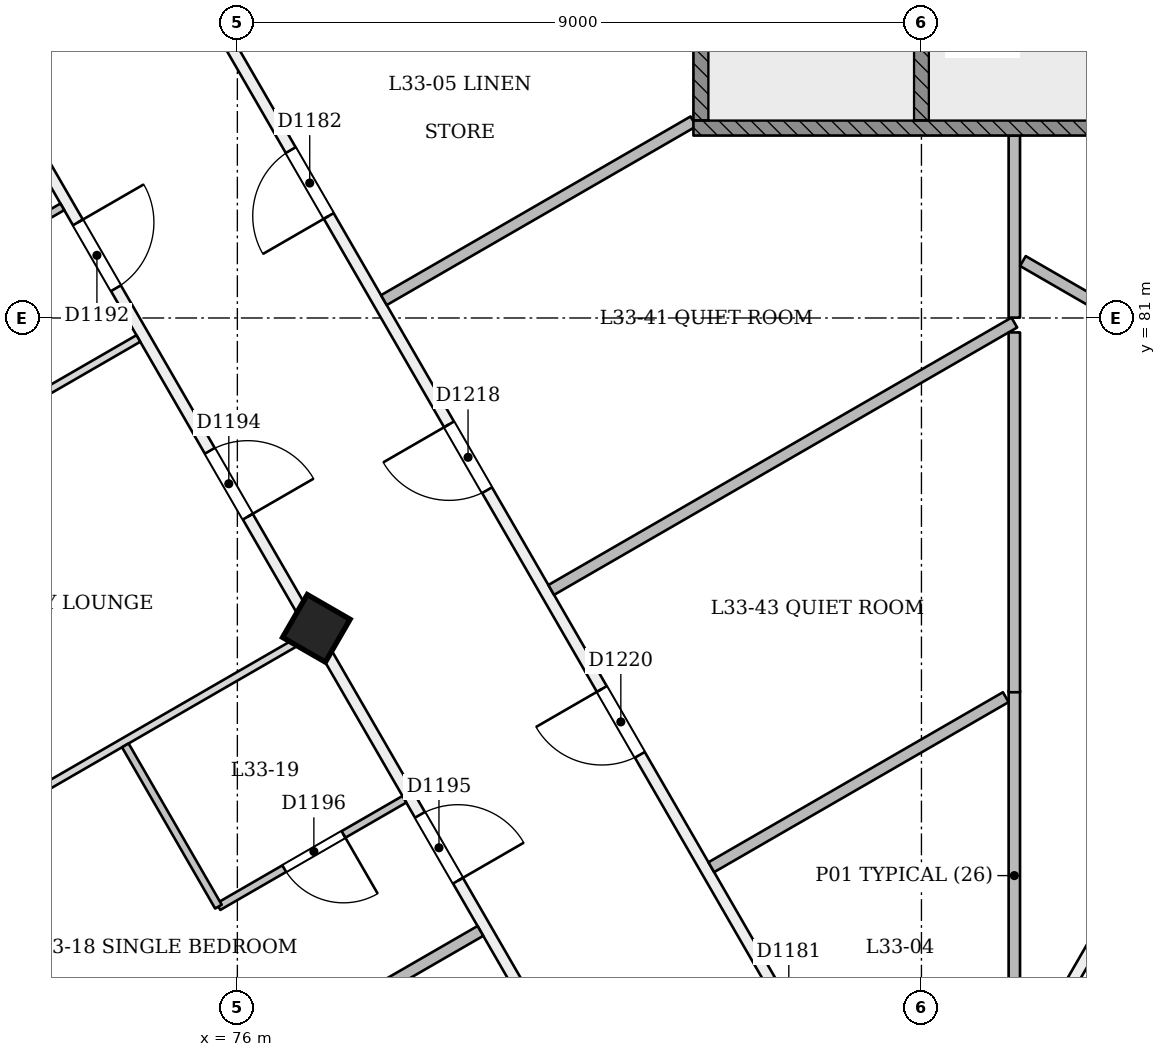
"""IFC4 building model, lengths in metres.
Left out: names, types, materials, properties, quantities, classifications, styles, units other than length and angle.
Written with IfcOpenShell. Run it as: python <this file> out.ifc"""

import sys

from ifc_helpers import new_model, si_unit, direction, frame, frame_2d, origin, origin_2d, place, context, subcontext, project, spatial, rectangle, extrude, element, fill, save


model = new_model("IFC4")
c1 = context("Model", 3, precision=1e-05, world=origin(), true_north=direction((0.0, 1.0)))
c2 = subcontext(c1, "Body", "Model", "MODEL_VIEW")
j1 = project(units=[si_unit("LENGTHUNIT", "METRE"), si_unit("PLANEANGLEUNIT", "RADIAN")], contexts=[c1])
p1 = place(None, origin())
s1 = spatial("IfcSite", under=j1, at=p1, CompositionType="ELEMENT")
p2 = place(p1, origin())
s2 = spatial("IfcBuilding", under=s1, at=p2, CompositionType="ELEMENT")
p3 = place(p2, frame((0.0, 0.0, 131.4)))
s3 = spatial("IfcBuildingStorey", under=s2, at=p3, CompositionType="ELEMENT", Elevation=131.4)
p4 = place(p3, frame((77.012, 76.87, -0.02), z_axis=(0.022155133694, 0.038483534979, 0.999013597298), x_axis=(-0.864982357223, -0.500326545966, 0.038456067068)))
e1 = element("IfcColumn", 1, at=p4, inside=s3, PredefinedType="COLUMN", context=c2, shape_type="SweptSolid", body=[
    extrude(rectangle(XDim=0.65, YDim=0.65, at=origin_2d()), origin(), (0.0, 0.0, 1.0), 3.604),
])
p5 = place(p3, frame((85.0, 68.836, 0.0), z_axis=(0.0, 0.0, 1.0), x_axis=(-0.500001726771, 0.86602440683, 0.0)))
e2 = element("IfcWall", 2, at=p5, inside=s3, PredefinedType="PARTITIONING", context=c2, shape_type="SweptSolid", body=[
    extrude(rectangle(XDim=24.669, YDim=0.15, at=frame_2d((12.335, 0.0))), origin(), (0.0, 0.0, 1.0), 3.15),
])
p6 = place(p5, frame((2.99, 0.0, 0.0)))
e3 = element("IfcOpeningElement", 3, at=p6, cuts=e2, PredefinedType="OPENING", context=c2, shape_type="SweptSolid", body=[
    extrude(rectangle(XDim=1.0, YDim=2.1, at=frame_2d((0.5, 1.05))), frame((0.0, 0.085, 0.0), z_axis=(0.0, -1.0, 0.0), x_axis=(1.0, 0.0, 0.0)), (0.0, 0.0, 1.0), 0.171),
])
p7 = place(p5, frame((15.596, 0.0, 0.0)))
e4 = element("IfcOpeningElement", 4, at=p7, cuts=e2, PredefinedType="OPENING", context=c2, shape_type="SweptSolid", body=[
    extrude(rectangle(XDim=1.0, YDim=2.1, at=frame_2d((0.5, 1.05))), frame((0.0, 0.085, 0.0), z_axis=(0.0, -1.0, 0.0), x_axis=(1.0, 0.0, 0.0)), (0.0, 0.0, 1.0), 0.171),
])
p8 = place(p5, frame((20.822, 0.0, 0.0)))
e5 = element("IfcOpeningElement", 5, at=p8, cuts=e2, PredefinedType="OPENING", context=c2, shape_type="SweptSolid", body=[
    extrude(rectangle(XDim=1.0, YDim=2.1, at=frame_2d((0.5, 1.05))), frame((0.0, 0.085, 0.0), z_axis=(0.0, -1.0, 0.0), x_axis=(1.0, 0.0, 0.0)), (0.0, 0.0, 1.0), 0.171),
])
p9 = place(p5, frame((11.43, 0.0, 0.0)))
e6 = element("IfcOpeningElement", 6, at=p9, cuts=e2, PredefinedType="OPENING", context=c2, shape_type="SweptSolid", body=[
    extrude(rectangle(XDim=1.0, YDim=2.1, at=frame_2d((0.5, 1.05))), frame((0.0, 0.085, 0.0), z_axis=(0.0, -1.0, 0.0), x_axis=(1.0, 0.0, 0.0)), (0.0, 0.0, 1.0), 0.171),
])
p10 = place(p5, frame((7.41, 0.0, 0.0)))
e7 = element("IfcOpeningElement", 7, at=p10, cuts=e2, PredefinedType="OPENING", context=c2, shape_type="SweptSolid", body=[
    extrude(rectangle(XDim=1.0, YDim=2.1, at=frame_2d((0.5, 1.05))), frame((0.0, 0.085, 0.0), z_axis=(0.0, -1.0, 0.0), x_axis=(1.0, 0.0, 0.0)), (0.0, 0.0, 1.0), 0.171),
])
p11 = place(p3, frame((64.656, 98.273, 0.0), z_axis=(0.0, 0.0, 1.0), x_axis=(0.500001784794, -0.866024373331, 0.0)))
e8 = element("IfcWall", 8, at=p11, inside=s3, PredefinedType="PARTITIONING", context=c2, shape_type="SweptSolid", body=[
    extrude(rectangle(XDim=40.426, YDim=0.15, at=frame_2d((20.213, 0.0))), origin(), (0.0, 0.0, 1.0), 2.75),
])
p12 = place(p11, frame((0.2, 0.0, 0.0)))
e9 = element("IfcOpeningElement", 9, at=p12, cuts=e8, PredefinedType="OPENING", context=c2, shape_type="SweptSolid", body=[
    extrude(rectangle(XDim=1.2, YDim=2.1, at=frame_2d((0.6, 1.05))), frame((0.0, 0.085, 0.0), z_axis=(0.0, -1.0, 0.0), x_axis=(1.0, 0.0, 0.0)), (0.0, 0.0, 1.0), 0.171),
])
p13 = place(p11, frame((2.933, 0.0, 0.0)))
e10 = element("IfcOpeningElement", 10, at=p13, cuts=e8, PredefinedType="OPENING", context=c2, shape_type="SweptSolid", body=[
    extrude(rectangle(XDim=1.0, YDim=2.1, at=frame_2d((0.5, 1.05))), frame((0.0, 0.085, 0.0), z_axis=(0.0, -1.0, 0.0), x_axis=(1.0, 0.0, 0.0)), (0.0, 0.0, 1.0), 0.171),
])
p14 = place(p11, frame((9.608, 0.0, 0.0)))
e11 = element("IfcOpeningElement", 11, at=p14, cuts=e8, PredefinedType="OPENING", context=c2, shape_type="SweptSolid", body=[
    extrude(rectangle(XDim=1.0, YDim=2.1, at=frame_2d((0.5, 1.05))), frame((0.0, 0.085, 0.0), z_axis=(0.0, -1.0, 0.0), x_axis=(1.0, 0.0, 0.0)), (0.0, 0.0, 1.0), 0.171),
])
p15 = place(p11, frame((11.818, 0.0, 0.0)))
e12 = element("IfcOpeningElement", 12, at=p15, cuts=e8, PredefinedType="OPENING", context=c2, shape_type="SweptSolid", body=[
    extrude(rectangle(XDim=1.0, YDim=2.1, at=frame_2d((0.5, 1.05))), frame((0.0, 0.085, 0.0), z_axis=(0.0, -1.0, 0.0), x_axis=(1.0, 0.0, 0.0)), (0.0, 0.0, 1.0), 0.171),
])
p16 = place(p11, frame((18.493, 0.0, 0.0)))
e13 = element("IfcOpeningElement", 13, at=p16, cuts=e8, PredefinedType="OPENING", context=c2, shape_type="SweptSolid", body=[
    extrude(rectangle(XDim=1.0, YDim=2.1, at=frame_2d((0.5, 1.05))), frame((0.0, 0.085, 0.0), z_axis=(0.0, -1.0, 0.0), x_axis=(1.0, 0.0, 0.0)), (0.0, 0.0, 1.0), 0.171),
])
p17 = place(p11, frame((21.963, 0.0, 0.0)))
e14 = element("IfcOpeningElement", 14, at=p17, cuts=e8, PredefinedType="OPENING", context=c2, shape_type="SweptSolid", body=[
    extrude(rectangle(XDim=1.0, YDim=2.1, at=frame_2d((0.5, 1.05))), frame((0.0, 0.085, 0.0), z_axis=(0.0, -1.0, 0.0), x_axis=(1.0, 0.0, 0.0)), (0.0, 0.0, 1.0), 0.171),
])
p18 = place(p11, frame((27.493, 0.0, 0.0)))
e15 = element("IfcOpeningElement", 15, at=p18, cuts=e8, PredefinedType="OPENING", context=c2, shape_type="SweptSolid", body=[
    extrude(rectangle(XDim=1.0, YDim=2.1, at=frame_2d((0.5, 1.05))), frame((0.0, 0.085, 0.0), z_axis=(0.0, -1.0, 0.0), x_axis=(1.0, 0.0, 0.0)), (0.0, 0.0, 1.0), 0.171),
])
p19 = place(p11, frame((30.963, 0.0, 0.0)))
e16 = element("IfcOpeningElement", 16, at=p19, cuts=e8, PredefinedType="OPENING", context=c2, shape_type="SweptSolid", body=[
    extrude(rectangle(XDim=1.0, YDim=2.1, at=frame_2d((0.5, 1.05))), frame((0.0, 0.085, 0.0), z_axis=(0.0, -1.0, 0.0), x_axis=(1.0, 0.0, 0.0)), (0.0, 0.0, 1.0), 0.171),
])
p20 = place(p11, frame((36.493, 0.0, 0.0)))
e17 = element("IfcOpeningElement", 17, at=p20, cuts=e8, PredefinedType="OPENING", context=c2, shape_type="SweptSolid", body=[
    extrude(rectangle(XDim=1.0, YDim=2.1, at=frame_2d((0.5, 1.05))), frame((0.0, 0.085, 0.0), z_axis=(0.0, -1.0, 0.0), x_axis=(1.0, 0.0, 0.0)), (0.0, 0.0, 1.0), 0.171),
])
p21 = place(p11, frame((39.101, 0.0, 0.0)))
e18 = element("IfcOpeningElement", 18, at=p21, cuts=e8, PredefinedType="OPENING", context=c2, shape_type="SweptSolid", body=[
    extrude(rectangle(XDim=1.0, YDim=2.1, at=frame_2d((0.5, 1.05))), frame((0.0, 0.085, 0.0), z_axis=(0.0, -1.0, 0.0), x_axis=(1.0, 0.0, 0.0)), (0.0, 0.0, 1.0), 0.171),
])
p22 = place(p3, frame((85.131, 63.263, 0.0), z_axis=(0.0, 0.0, 1.0), x_axis=(0.500002881847, 0.866023739943, 0.0)))
e19 = element("IfcWall", 19, at=p22, inside=s3, PredefinedType="PARTITIONING", context=c2, shape_type="SweptSolid", body=[
    extrude(rectangle(XDim=34.013, YDim=0.15, at=frame_2d((17.006, 0.0))), origin(), (0.0, 0.0, 1.0), 2.75),
])
p23 = place(p22, frame((0.351, 0.0, 0.0)))
e20 = element("IfcOpeningElement", 20, at=p23, cuts=e19, PredefinedType="OPENING", context=c2, shape_type="SweptSolid", body=[
    extrude(rectangle(XDim=1.2, YDim=2.1, at=frame_2d((0.6, 1.05))), frame((0.0, 0.085, 0.0), z_axis=(0.0, -1.0, 0.0), x_axis=(1.0, 0.0, 0.0)), (0.0, 0.0, 1.0), 0.171),
])
p24 = place(p22, frame((3.963, 0.0, 0.0)))
e21 = element("IfcOpeningElement", 21, at=p24, cuts=e19, PredefinedType="OPENING", context=c2, shape_type="SweptSolid", body=[
    extrude(rectangle(XDim=1.0, YDim=2.1, at=frame_2d((0.5, 1.05))), frame((0.0, 0.085, 0.0), z_axis=(0.0, -1.0, 0.0), x_axis=(1.0, 0.0, 0.0)), (0.0, 0.0, 1.0), 0.171),
])
p25 = place(p22, frame((9.493, 0.0, 0.0)))
e22 = element("IfcOpeningElement", 22, at=p25, cuts=e19, PredefinedType="OPENING", context=c2, shape_type="SweptSolid", body=[
    extrude(rectangle(XDim=1.0, YDim=2.1, at=frame_2d((0.5, 1.05))), frame((0.0, 0.085, 0.0), z_axis=(0.0, -1.0, 0.0), x_axis=(1.0, 0.0, 0.0)), (0.0, 0.0, 1.0), 0.171),
])
p26 = place(p22, frame((11.818, 0.0, 0.0)))
e23 = element("IfcOpeningElement", 23, at=p26, cuts=e19, PredefinedType="OPENING", context=c2, shape_type="SweptSolid", body=[
    extrude(rectangle(XDim=1.0, YDim=2.1, at=frame_2d((0.5, 1.05))), frame((0.0, 0.085, 0.0), z_axis=(0.0, -1.0, 0.0), x_axis=(1.0, 0.0, 0.0)), (0.0, 0.0, 1.0), 0.171),
])
p27 = place(p22, frame((18.608, 0.0, 0.0)))
e24 = element("IfcOpeningElement", 24, at=p27, cuts=e19, PredefinedType="OPENING", context=c2, shape_type="SweptSolid", body=[
    extrude(rectangle(XDim=1.0, YDim=2.1, at=frame_2d((0.5, 1.05))), frame((0.0, 0.085, 0.0), z_axis=(0.0, -1.0, 0.0), x_axis=(1.0, 0.0, 0.0)), (0.0, 0.0, 1.0), 0.171),
])
p28 = place(p22, frame((20.933, 0.0, 0.0)))
e25 = element("IfcOpeningElement", 25, at=p28, cuts=e19, PredefinedType="OPENING", context=c2, shape_type="SweptSolid", body=[
    extrude(rectangle(XDim=1.0, YDim=2.1, at=frame_2d((0.5, 1.05))), frame((0.0, 0.085, 0.0), z_axis=(0.0, -1.0, 0.0), x_axis=(1.0, 0.0, 0.0)), (0.0, 0.0, 1.0), 0.171),
])
p29 = place(p22, frame((27.493, 0.0, 0.0)))
e26 = element("IfcOpeningElement", 26, at=p29, cuts=e19, PredefinedType="OPENING", context=c2, shape_type="SweptSolid", body=[
    extrude(rectangle(XDim=1.0, YDim=2.1, at=frame_2d((0.5, 1.05))), frame((0.0, 0.085, 0.0), z_axis=(0.0, -1.0, 0.0), x_axis=(1.0, 0.0, 0.0)), (0.0, 0.0, 1.0), 0.171),
])
p30 = place(p22, frame((29.933, 0.0, 0.0)))
e27 = element("IfcOpeningElement", 27, at=p30, cuts=e19, PredefinedType="OPENING", context=c2, shape_type="SweptSolid", body=[
    extrude(rectangle(XDim=1.0, YDim=2.1, at=frame_2d((0.5, 1.05))), frame((0.0, 0.085, 0.0), z_axis=(0.0, -1.0, 0.0), x_axis=(1.0, 0.0, 0.0)), (0.0, 0.0, 1.0), 0.171),
])
p31 = place(p3, frame((97.335, 90.2, 0.0), z_axis=(0.0, 0.0, 1.0), x_axis=(-0.500002918398, -0.86602371884, 0.0)))
e28 = element("IfcWall", 28, at=p31, inside=s3, PredefinedType="PARTITIONING", context=c2, shape_type="SweptSolid", body=[
    extrude(rectangle(XDim=24.539, YDim=0.15, at=frame_2d((12.27, 0.0))), origin(), (0.0, 0.0, 1.0), 3.15),
])
p32 = place(p31, frame((6.442, 0.0, 0.0)))
e29 = element("IfcOpeningElement", 29, at=p32, cuts=e28, PredefinedType="OPENING", context=c2, shape_type="SweptSolid", body=[
    extrude(rectangle(XDim=0.9, YDim=2.1, at=frame_2d((0.45, 1.05))), frame((0.0, 0.085, 0.0), z_axis=(0.0, -1.0, 0.0), x_axis=(1.0, 0.0, 0.0)), (0.0, 0.0, 1.0), 0.171),
])
p33 = place(p31, frame((2.46, 0.0, 0.0)))
e30 = element("IfcOpeningElement", 30, at=p33, cuts=e28, PredefinedType="OPENING", context=c2, shape_type="SweptSolid", body=[
    extrude(rectangle(XDim=0.9, YDim=2.1, at=frame_2d((0.45, 1.05))), frame((0.0, 0.085, 0.0), z_axis=(0.0, -1.0, 0.0), x_axis=(1.0, 0.0, 0.0)), (0.0, 0.0, 1.0), 0.171),
])
p34 = place(p31, frame((15.454, 0.0, 0.0)))
e31 = element("IfcOpeningElement", 31, at=p34, cuts=e28, PredefinedType="OPENING", context=c2, shape_type="SweptSolid", body=[
    extrude(rectangle(XDim=1.0, YDim=2.1, at=frame_2d((0.5, 1.05))), frame((0.0, 0.085, 0.0), z_axis=(0.0, -1.0, 0.0), x_axis=(1.0, 0.0, 0.0)), (0.0, 0.0, 1.0), 0.171),
])
p35 = place(p31, frame((10.281, 0.0, 0.0)))
e32 = element("IfcOpeningElement", 32, at=p35, cuts=e28, PredefinedType="OPENING", context=c2, shape_type="SweptSolid", body=[
    extrude(rectangle(XDim=1.0, YDim=2.1, at=frame_2d((0.5, 1.05))), frame((0.0, 0.085, 0.0), z_axis=(0.0, -1.0, 0.0), x_axis=(1.0, 0.0, 0.0)), (0.0, 0.0, 1.0), 0.171),
])
p36 = place(p3, frame((86.222, 71.232, 0.0), z_axis=(0.0, 0.0, 1.0), x_axis=(0.0, 1.0, 0.0)))
e33 = element("IfcWall", 33, at=p36, inside=s3, PredefinedType="PARTITIONING", context=c2, shape_type="SweptSolid", body=[
    extrude(rectangle(XDim=4.864, YDim=0.15, at=frame_2d((2.432, 0.0))), origin(), (0.0, 0.0, 1.0), 3.15),
])
p37 = place(p3, frame((86.109, 76.011, 0.0), z_axis=(0.0, 0.0, 1.0), x_axis=(-0.866024728453, -0.500001169707, 0.0)))
e34 = element("IfcWall", 34, at=p37, inside=s3, PredefinedType="PARTITIONING", context=c2, shape_type="SweptSolid", body=[
    extrude(rectangle(XDim=4.474, YDim=0.15, at=frame_2d((2.237, 0.0))), origin(), (0.0, 0.0, 1.0), 3.15),
])
p38 = place(p3, frame((77.928, 81.235, 0.0), z_axis=(0.0, 0.0, 1.0), x_axis=(0.866029956157, 0.499992114976, 0.0)))
e35 = element("IfcWall", 35, at=p38, inside=s3, PredefinedType="PARTITIONING", context=c2, shape_type="SweptSolid", body=[
    extrude(rectangle(XDim=4.702, YDim=0.15, at=frame_2d((2.351, 0.0))), origin(), (0.0, 0.0, 1.0), 3.15),
])
p39 = place(p3, frame((73.697, 82.462, 0.0), z_axis=(0.0, 0.0, 1.0), x_axis=(-0.865989837833, -0.500061596976, 0.0)))
e36 = element("IfcWall", 36, at=p39, inside=s3, PredefinedType="PARTITIONING", context=c2, shape_type="SweptSolid", body=[
    extrude(rectangle(XDim=2.825, YDim=0.1, at=frame_2d((1.413, 0.0))), origin(), (0.0, 0.0, 1.0), 3.15),
])
p40 = place(p39, frame((0.925, 0.0, 0.0)))
e37 = element("IfcOpeningElement", 37, at=p40, cuts=e36, PredefinedType="OPENING", context=c2, shape_type="SweptSolid", body=[
    extrude(rectangle(XDim=0.9, YDim=2.1, at=frame_2d((0.45, 1.05))), frame((0.0, 0.061, 0.0), z_axis=(0.0, -1.0, 0.0), x_axis=(1.0, 0.0, 0.0)), (0.0, 0.0, 1.0), 0.121),
])
p41 = place(p3, frame((69.202, 77.558, 0.0), z_axis=(0.0, 0.0, 1.0), x_axis=(0.866025401434, 0.500000004071, 0.0)))
e38 = element("IfcWall", 38, at=p41, inside=s3, PredefinedType="PARTITIONING", context=c2, shape_type="SweptSolid", body=[
    extrude(rectangle(XDim=6.345, YDim=0.1, at=frame_2d((3.173, 0.0))), origin(), (0.0, 0.0, 1.0), 2.65),
])
p42 = place(p3, frame((71.47, 73.671, 0.0), z_axis=(0.0, 0.0, 1.0), x_axis=(0.866015887322, 0.500016482634, 0.0)))
e39 = element("IfcWall", 39, at=p42, inside=s3, PredefinedType="PARTITIONING", context=c2, shape_type="SweptSolid", body=[
    extrude(rectangle(XDim=6.325, YDim=0.1, at=frame_2d((3.163, 0.0))), origin(), (0.0, 0.0, 1.0), 2.65),
])
p43 = place(p3, frame((78.197, 74.668, 0.0), z_axis=(0.0, 0.0, 1.0), x_axis=(-0.865989837833, -0.500061596976, 0.0)))
e40 = element("IfcWall", 40, at=p43, inside=s3, PredefinedType="PARTITIONING", context=c2, shape_type="SweptSolid", body=[
    extrude(rectangle(XDim=2.825, YDim=0.1, at=frame_2d((1.413, 0.0))), origin(), (0.0, 0.0, 1.0), 3.15),
])
p44 = place(p43, frame((0.925, 0.0, 0.0)))
e41 = element("IfcOpeningElement", 41, at=p44, cuts=e40, PredefinedType="OPENING", context=c2, shape_type="SweptSolid", body=[
    extrude(rectangle(XDim=0.9, YDim=2.1, at=frame_2d((0.45, 1.05))), frame((0.0, 0.061, 0.0), z_axis=(0.0, -1.0, 0.0), x_axis=(1.0, 0.0, 0.0)), (0.0, 0.0, 1.0), 0.121),
])
p45 = place(p3, frame((75.751, 73.256, 0.0), z_axis=(0.0, 0.0, 1.0), x_axis=(-0.500018594424, 0.866014668023, 0.0)))
e42 = element("IfcWall", 42, at=p45, inside=s3, PredefinedType="PARTITIONING", context=c2, shape_type="SweptSolid", body=[
    extrude(rectangle(XDim=2.45, YDim=0.1, at=frame_2d((1.225, 0.0))), origin(), (0.0, 0.0, 1.0), 2.75),
])
p46 = place(p3, frame((73.702, 69.763, 0.0), z_axis=(0.0, 0.0, 1.0), x_axis=(0.866025401434, 0.500000004071, 0.0)))
e43 = element("IfcWall", 43, at=p46, inside=s3, PredefinedType="PARTITIONING", context=c2, shape_type="SweptSolid", body=[
    extrude(rectangle(XDim=6.345, YDim=0.15, at=frame_2d((3.173, 0.0))), origin(), (0.0, 0.0, 1.0), 2.65),
])
p47 = place(p3, frame((80.129, 77.422, 0.0), z_axis=(0.0, 0.0, 1.0), x_axis=(0.866030712881, 0.499990804263, 0.0)))
e44 = element("IfcWall", 44, at=p47, inside=s3, PredefinedType="PARTITIONING", context=c2, shape_type="SweptSolid", body=[
    extrude(rectangle(XDim=7.035, YDim=0.15, at=frame_2d((3.518, 0.0))), origin(), (0.0, 0.0, 1.0), 3.15),
])
p48 = place(p3, frame((86.222, 81.005, 0.0), z_axis=(0.0, 0.0, 1.0), x_axis=(0.0, 1.0, 0.0)))
e45 = element("IfcWall", 45, at=p48, inside=s3, PredefinedType="PARTITIONING", context=c2, shape_type="SweptSolid", body=[
    extrude(rectangle(XDim=2.395, YDim=0.15, at=frame_2d((1.198, 0.0))), origin(), (0.0, 0.0, 1.0), 3.15),
])
p49 = place(p3, frame((86.222, 80.81, 0.0), z_axis=(0.0, 0.0, 1.0), x_axis=(0.0, -1.0, 0.0)))
e46 = element("IfcWall", 46, at=p49, inside=s3, PredefinedType="PARTITIONING", context=c2, shape_type="SweptSolid", body=[
    extrude(rectangle(XDim=4.734, YDim=0.15, at=frame_2d((2.367, 0.0))), origin(), (0.0, 0.0, 1.0), 3.15),
])
p50 = place(p3, frame((90.86, 79.136, 0.0), z_axis=(0.0, 0.0, 1.0), x_axis=(-0.866023771128, 0.500002827834, 0.0)))
e47 = element("IfcWall", 47, at=p50, inside=s3, PredefinedType="PARTITIONING", context=c2, shape_type="SweptSolid", body=[
    extrude(rectangle(XDim=5.226, YDim=0.15, at=frame_2d((2.613, 0.0))), origin(), (0.0, 0.0, 1.0), 3.15),
])
p51 = place(p3, frame((82.0, 83.5, 0.0), z_axis=(0.0, 0.0, 1.0), x_axis=(1.0, 0.0, 0.0)))
e48 = element("IfcWall", 48, at=p51, inside=s3, PredefinedType="SOLIDWALL", context=c2, shape_type="SweptSolid", body=[
    extrude(rectangle(XDim=6.0, YDim=0.2, at=frame_2d((3.0, 0.0))), origin(), (0.0, 0.0, 1.0), 3.15),
])
for number, where, z_axis, x_axis in (
    (49, (82.1, 83.6, 0.0), (0.0, 0.0, 1.0), (0.0, 1.0, 0.0)),
    (50, (85.0, 83.6, 0.0), (0.0, 0.0, 1.0), (0.0, 1.0, 0.0)),
):
    element("IfcWall", number, at=place(p3, frame(where, z_axis=z_axis, x_axis=x_axis)), inside=s3, PredefinedType="SOLIDWALL", context=c2, shape_type="SweptSolid", body=[
        extrude(rectangle(XDim=6.8, YDim=0.2, at=frame_2d((3.4, 0.0))), origin(), (0.0, 0.0, 1.0), 3.15),
    ])
p52 = place(p7, origin())
e51 = element("IfcDoor", 51, at=p52, inside=s3, OperationType="SINGLE_SWING_LEFT", PredefinedType="NOTDEFINED", context=c2, shape_type="SweptSolid", body=[
    extrude(rectangle(XDim=1.0, YDim=2.1, at=frame_2d((0.5, 1.05))), frame((0.0, 0.025, 0.0), z_axis=(0.0, -1.0, 0.0), x_axis=(1.0, 0.0, 0.0)), (0.0, 0.0, 1.0), 0.05),
])
fill(e4, e51)
p53 = place(p16, origin())
e52 = element("IfcDoor", 52, at=p53, inside=s3, OperationType="SINGLE_SWING_LEFT", PredefinedType="NOTDEFINED", context=c2, shape_type="SweptSolid", body=[
    extrude(rectangle(XDim=1.0, YDim=2.1, at=frame_2d((0.5, 1.05))), frame((0.0, 0.025, 0.0), z_axis=(0.0, -1.0, 0.0), x_axis=(1.0, 0.0, 0.0)), (0.0, 0.0, 1.0), 0.05),
])
fill(e13, e52)
p54 = place(p17, origin())
e53 = element("IfcDoor", 53, at=p54, inside=s3, OperationType="SINGLE_SWING_RIGHT", PredefinedType="NOTDEFINED", context=c2, shape_type="SweptSolid", body=[
    extrude(rectangle(XDim=1.0, YDim=2.1, at=frame_2d((0.5, 1.05))), frame((0.0, 0.025, 0.0), z_axis=(0.0, -1.0, 0.0), x_axis=(1.0, 0.0, 0.0)), (0.0, 0.0, 1.0), 0.05),
])
fill(e14, e53)
p55 = place(p18, origin())
e54 = element("IfcDoor", 54, at=p55, inside=s3, OperationType="SINGLE_SWING_RIGHT", PredefinedType="NOTDEFINED", context=c2, shape_type="SweptSolid", body=[
    extrude(rectangle(XDim=1.0, YDim=2.1, at=frame_2d((0.5, 1.05))), frame((0.0, 0.025, 0.0), z_axis=(0.0, -1.0, 0.0), x_axis=(1.0, 0.0, 0.0)), (0.0, 0.0, 1.0), 0.05),
])
fill(e15, e54)
p56 = place(p44, origin())
e55 = element("IfcDoor", 55, at=p56, inside=s3, OperationType="SINGLE_SWING_LEFT", PredefinedType="NOTDEFINED", context=c2, shape_type="SweptSolid", body=[
    extrude(rectangle(XDim=0.9, YDim=2.1, at=frame_2d((0.45, 1.05))), frame((0.0, 0.025, 0.0), z_axis=(0.0, -1.0, 0.0), x_axis=(1.0, 0.0, 0.0)), (0.0, 0.0, 1.0), 0.05),
])
fill(e41, e55)
p57 = place(p9, origin())
e56 = element("IfcDoor", 56, at=p57, inside=s3, OperationType="SINGLE_SWING_RIGHT", PredefinedType="NOTDEFINED", context=c2, shape_type="SweptSolid", body=[
    extrude(rectangle(XDim=1.0, YDim=2.1, at=frame_2d((0.5, 1.05))), frame((0.0, 0.025, 0.0), z_axis=(0.0, -1.0, 0.0), x_axis=(1.0, 0.0, 0.0)), (0.0, 0.0, 1.0), 0.05),
])
fill(e6, e56)
p58 = place(p10, origin())
e57 = element("IfcDoor", 57, at=p58, inside=s3, OperationType="SINGLE_SWING_RIGHT", PredefinedType="NOTDEFINED", context=c2, shape_type="SweptSolid", body=[
    extrude(rectangle(XDim=1.0, YDim=2.1, at=frame_2d((0.5, 1.05))), frame((0.0, 0.025, 0.0), z_axis=(0.0, -1.0, 0.0), x_axis=(1.0, 0.0, 0.0)), (0.0, 0.0, 1.0), 0.05),
])
fill(e7, e57)
save(model, sys.argv[1])
